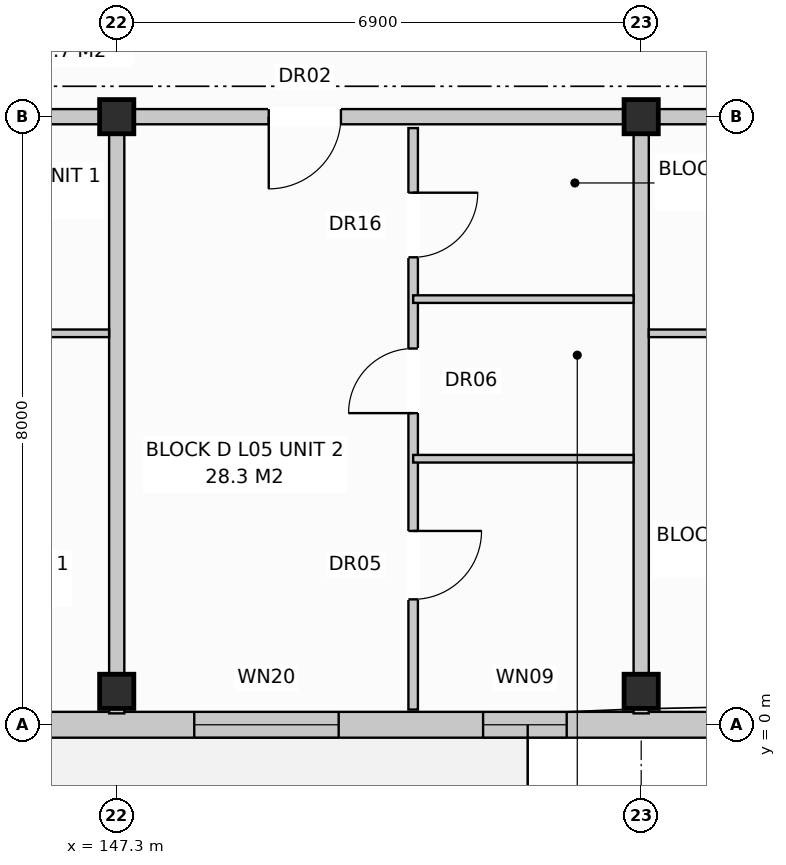
"""IFC4 building model, lengths in metres.
Left out: names, types, materials, properties, quantities, classifications, styles, units other than length and angle.
Written with IfcOpenShell. Run it as: python <this file> out.ifc"""

import sys

from ifc_helpers import new_model, si_unit, direction, frame, frame_2d, origin, origin_with_axes, origin_2d, place, context, subcontext, project, spatial, rectangle, extrude, element, fill, save


model = new_model("IFC4")
c1 = context("Model", 3, precision=1e-05, world=origin(), true_north=direction((0.0, 1.0)))
c2 = subcontext(c1, "Body", "Model", "MODEL_VIEW")
j1 = project(units=[si_unit("LENGTHUNIT", "METRE"), si_unit("PLANEANGLEUNIT", "RADIAN")], contexts=[c1])
p1 = place(None, origin())
s1 = spatial("IfcSite", under=j1, at=p1, CompositionType="ELEMENT")
p2 = place(p1, origin())
s2 = spatial("IfcBuilding", under=s1, at=p2, CompositionType="ELEMENT")
p3 = place(p2, frame((0.0, 0.0, 17.6)))
s3 = spatial("IfcBuildingStorey", under=s2, at=p3, CompositionType="ELEMENT", Elevation=17.6)
for number, where, z_axis, x_axis in (
    (1, (147.3, 0.44, 0.0), (0.0, 0.0, 1.0), (1.0, 0.0, 0.0)),
    (2, (147.3, 8.0, 0.0), (0.0, 0.0, 1.0), (1.0, 0.0, 0.0)),
    (3, (154.2, 0.44, 0.0), (0.0, 0.0, 1.0), (1.0, 0.0, 0.0)),
    (4, (154.2, 8.0, 0.0), (0.0, 0.0, 1.0), (1.0, 0.0, 0.0)),
):
    element("IfcColumn", number, at=place(p3, frame(where, z_axis=z_axis, x_axis=x_axis)), inside=s3, PredefinedType="COLUMN", context=c2, shape_type="SweptSolid", body=[
        extrude(rectangle(XDim=0.45, YDim=0.45, at=origin_2d()), origin(), (0.0, 0.0, 1.0), 3.2),
    ])
p4 = place(p3, frame((126.76, 0.0, 0.0), z_axis=(0.0, 0.0, 1.0), x_axis=(1.0, 0.0, 0.0)))
e5 = element("IfcWall", 5, at=p4, inside=s3, PredefinedType="STANDARD", context=c2, shape_type="SweptSolid", body=[
    extrude(rectangle(XDim=41.08, YDim=0.34, at=frame_2d((20.54, 0.0))), origin(), (0.0, 0.0, 1.0), 2.95),
])
p5 = place(p4, frame((4.853, 0.0, 0.0)))
e6 = element("IfcOpeningElement", 6, at=p5, cuts=e5, PredefinedType="OPENING", context=c2, shape_type="SweptSolid", body=[
    extrude(rectangle(XDim=1.05, YDim=2.12, at=frame_2d((0.525, 1.06))), frame((0.0, 0.182, 0.0), z_axis=(0.0, -1.0, 0.0), x_axis=(1.0, 0.0, 0.0)), (0.0, 0.0, 1.0), 0.364),
])
p6 = place(p4, frame((15.253, 0.0, 0.0)))
e7 = element("IfcOpeningElement", 7, at=p6, cuts=e5, PredefinedType="OPENING", context=c2, shape_type="SweptSolid", body=[
    extrude(rectangle(XDim=1.05, YDim=2.12, at=frame_2d((0.525, 1.06))), frame((0.0, 0.182, 0.0), z_axis=(0.0, -1.0, 0.0), x_axis=(1.0, 0.0, 0.0)), (0.0, 0.0, 1.0), 0.364),
])
p7 = place(p4, frame((30.353, 0.0, 0.0)))
e8 = element("IfcOpeningElement", 8, at=p7, cuts=e5, PredefinedType="OPENING", context=c2, shape_type="SweptSolid", body=[
    extrude(rectangle(XDim=1.05, YDim=2.12, at=frame_2d((0.525, 1.06))), frame((0.0, 0.182, 0.0), z_axis=(0.0, -1.0, 0.0), x_axis=(1.0, 0.0, 0.0)), (0.0, 0.0, 1.0), 0.364),
])
p8 = place(p4, frame((2.46, 0.0, 0.72)))
e9 = element("IfcOpeningElement", 9, at=p8, cuts=e5, PredefinedType="OPENING", context=c2, shape_type="SweptSolid", body=[
    extrude(rectangle(XDim=1.1, YDim=1.5, at=frame_2d((0.55, 0.75))), frame((0.0, 0.182, 0.0), z_axis=(0.0, -1.0, 0.0), x_axis=(1.0, 0.0, 0.0)), (0.0, 0.0, 1.0), 0.364),
])
p9 = place(p4, frame((7.76, 0.0, 0.72)))
e10 = element("IfcOpeningElement", 10, at=p9, cuts=e5, PredefinedType="OPENING", context=c2, shape_type="SweptSolid", body=[
    extrude(rectangle(XDim=1.9, YDim=1.85, at=frame_2d((0.95, 0.925))), frame((0.0, 0.182, 0.0), z_axis=(0.0, -1.0, 0.0), x_axis=(1.0, 0.0, 0.0)), (0.0, 0.0, 1.0), 0.364),
])
p10 = place(p4, frame((11.81, 0.0, 0.72)))
e11 = element("IfcOpeningElement", 11, at=p10, cuts=e5, PredefinedType="OPENING", context=c2, shape_type="SweptSolid", body=[
    extrude(rectangle(XDim=1.1, YDim=1.5, at=frame_2d((0.55, 0.75))), frame((0.0, 0.182, 0.0), z_axis=(0.0, -1.0, 0.0), x_axis=(1.0, 0.0, 0.0)), (0.0, 0.0, 1.0), 0.364),
])
p11 = place(p4, frame((17.61, 0.0, 0.8)))
e12 = element("IfcOpeningElement", 12, at=p11, cuts=e5, PredefinedType="OPENING", context=c2, shape_type="SweptSolid", body=[
    extrude(rectangle(XDim=1.8, YDim=1.7, at=frame_2d((0.9, 0.85))), frame((0.0, 0.182, 0.0), z_axis=(0.0, -1.0, 0.0), x_axis=(1.0, 0.0, 0.0)), (0.0, 0.0, 1.0), 0.364),
])
p12 = place(p4, frame((21.56, 0.0, 0.72)))
e13 = element("IfcOpeningElement", 13, at=p12, cuts=e5, PredefinedType="OPENING", context=c2, shape_type="SweptSolid", body=[
    extrude(rectangle(XDim=1.9, YDim=1.85, at=frame_2d((0.95, 0.925))), frame((0.0, 0.182, 0.0), z_axis=(0.0, -1.0, 0.0), x_axis=(1.0, 0.0, 0.0)), (0.0, 0.0, 1.0), 0.364),
])
p13 = place(p4, frame((25.36, 0.0, 0.72)))
e14 = element("IfcOpeningElement", 14, at=p13, cuts=e5, PredefinedType="OPENING", context=c2, shape_type="SweptSolid", body=[
    extrude(rectangle(XDim=1.1, YDim=1.5, at=frame_2d((0.55, 0.75))), frame((0.0, 0.182, 0.0), z_axis=(0.0, -1.0, 0.0), x_axis=(1.0, 0.0, 0.0)), (0.0, 0.0, 1.0), 0.364),
])
p14 = place(p4, frame((28.56, 0.0, 0.72)))
e15 = element("IfcOpeningElement", 15, at=p14, cuts=e5, PredefinedType="OPENING", context=c2, shape_type="SweptSolid", body=[
    extrude(rectangle(XDim=1.1, YDim=1.5, at=frame_2d((0.55, 0.75))), frame((0.0, 0.182, 0.0), z_axis=(0.0, -1.0, 0.0), x_axis=(1.0, 0.0, 0.0)), (0.0, 0.0, 1.0), 0.364),
])
p15 = place(p4, frame((31.96, 0.0, 0.72)))
e16 = element("IfcOpeningElement", 16, at=p15, cuts=e5, PredefinedType="OPENING", context=c2, shape_type="SweptSolid", body=[
    extrude(rectangle(XDim=1.9, YDim=1.85, at=frame_2d((0.95, 0.925))), frame((0.0, 0.182, 0.0), z_axis=(0.0, -1.0, 0.0), x_axis=(1.0, 0.0, 0.0)), (0.0, 0.0, 1.0), 0.364),
])
p16 = place(p4, frame((38.06, 0.0, 0.72)))
e17 = element("IfcOpeningElement", 17, at=p16, cuts=e5, PredefinedType="OPENING", context=c2, shape_type="SweptSolid", body=[
    extrude(rectangle(XDim=1.1, YDim=1.5, at=frame_2d((0.55, 0.75))), frame((0.0, 0.182, 0.0), z_axis=(0.0, -1.0, 0.0), x_axis=(1.0, 0.0, 0.0)), (0.0, 0.0, 1.0), 0.364),
])
p17 = place(p3, frame((147.3, 7.85, 0.0), z_axis=(0.0, 0.0, 1.0), x_axis=(0.0, -1.0, 0.0)))
e18 = element("IfcWall", 18, at=p17, inside=s3, PredefinedType="PARTITIONING", context=c2, shape_type="SweptSolid", body=[
    extrude(rectangle(XDim=7.7, YDim=0.2, at=frame_2d((3.85, 0.0))), origin(), (0.0, 0.0, 1.0), 2.95),
])
p18 = place(p3, frame((126.6, 8.0, 0.0), z_axis=(0.0, 0.0, 1.0), x_axis=(1.0, 0.0, 0.0)))
e19 = element("IfcWall", 19, at=p18, inside=s3, PredefinedType="PARTITIONING", context=c2, shape_type="SweptSolid", body=[
    extrude(rectangle(XDim=20.7, YDim=0.2, at=frame_2d((10.35, 0.0))), origin(), (0.0, 0.0, 1.0), 2.39),
])
p19 = place(p18, frame((2.4, 0.0, 0.0)))
e20 = element("IfcOpeningElement", 20, at=p19, cuts=e19, PredefinedType="OPENING", context=c2, shape_type="SweptSolid", body=[
    extrude(rectangle(XDim=0.95, YDim=2.15, at=frame_2d((0.475, 1.075))), frame((0.0, 0.112, 0.0), z_axis=(0.0, -1.0, 0.0), x_axis=(1.0, 0.0, 0.0)), (0.0, 0.0, 1.0), 0.224),
])
p20 = place(p3, frame((132.9, 5.15, 0.0), z_axis=(0.0, 0.0, 1.0), x_axis=(1.0, 0.0, 0.0)))
e21 = element("IfcWall", 21, at=p20, inside=s3, PredefinedType="PARTITIONING", context=c2, shape_type="SweptSolid", body=[
    extrude(rectangle(XDim=14.3, YDim=0.1, at=frame_2d((7.15, 0.0))), origin(), (0.0, 0.0, 1.0), 2.95),
])
p21 = place(p20, frame((1.6, 0.0, 0.0)))
e22 = element("IfcOpeningElement", 22, at=p21, cuts=e21, PredefinedType="OPENING", context=c2, shape_type="SweptSolid", body=[
    extrude(rectangle(XDim=0.9, YDim=2.1, at=frame_2d((0.45, 1.05))), frame((0.0, 0.062, 0.0), z_axis=(0.0, -1.0, 0.0), x_axis=(1.0, 0.0, 0.0)), (0.0, 0.0, 1.0), 0.124),
])
p22 = place(p20, frame((5.1, 0.0, 0.0)))
e23 = element("IfcOpeningElement", 23, at=p22, cuts=e21, PredefinedType="OPENING", context=c2, shape_type="SweptSolid", body=[
    extrude(rectangle(XDim=0.85, YDim=2.05, at=frame_2d((0.425, 1.025))), frame((0.0, 0.062, 0.0), z_axis=(0.0, -1.0, 0.0), x_axis=(1.0, 0.0, 0.0)), (0.0, 0.0, 1.0), 0.124),
])
p23 = place(p20, frame((8.2, 0.0, 0.0)))
e24 = element("IfcOpeningElement", 24, at=p23, cuts=e21, PredefinedType="OPENING", context=c2, shape_type="SweptSolid", body=[
    extrude(rectangle(XDim=0.85, YDim=2.05, at=frame_2d((0.425, 1.025))), frame((0.0, 0.062, 0.0), z_axis=(0.0, -1.0, 0.0), x_axis=(1.0, 0.0, 0.0)), (0.0, 0.0, 1.0), 0.124),
])
p24 = place(p20, frame((11.6, 0.0, 0.0)))
e25 = element("IfcOpeningElement", 25, at=p24, cuts=e21, PredefinedType="OPENING", context=c2, shape_type="SweptSolid", body=[
    extrude(rectangle(XDim=0.85, YDim=2.05, at=frame_2d((0.425, 1.025))), frame((0.0, 0.062, 0.0), z_axis=(0.0, -1.0, 0.0), x_axis=(1.0, 0.0, 0.0)), (0.0, 0.0, 1.0), 0.124),
])
p25 = place(p3, frame((154.2, 7.85, 0.0), z_axis=(0.0, 0.0, 1.0), x_axis=(0.0, -1.0, 0.0)))
e26 = element("IfcWall", 26, at=p25, inside=s3, PredefinedType="PARTITIONING", context=c2, shape_type="SweptSolid", body=[
    extrude(rectangle(XDim=7.7, YDim=0.2, at=frame_2d((3.85, 0.0))), origin(), (0.0, 0.0, 1.0), 2.95),
])
p26 = place(p3, frame((147.3, 8.0, 0.0), z_axis=(0.0, 0.0, 1.0), x_axis=(1.0, 0.0, 0.0)))
e27 = element("IfcWall", 27, at=p26, inside=s3, PredefinedType="PARTITIONING", context=c2, shape_type="SweptSolid", body=[
    extrude(rectangle(XDim=6.9, YDim=0.2, at=frame_2d((3.45, 0.0))), origin(), (0.0, 0.0, 1.0), 2.39),
])
p27 = place(p26, frame((2.0, 0.0, 0.0)))
e28 = element("IfcOpeningElement", 28, at=p27, cuts=e27, PredefinedType="OPENING", context=c2, shape_type="SweptSolid", body=[
    extrude(rectangle(XDim=0.95, YDim=2.15, at=frame_2d((0.475, 1.075))), frame((0.0, 0.112, 0.0), z_axis=(0.0, -1.0, 0.0), x_axis=(1.0, 0.0, 0.0)), (0.0, 0.0, 1.0), 0.224),
])
p28 = place(p3, frame((151.2, 7.85, 0.0), z_axis=(0.0, 0.0, 1.0), x_axis=(0.0, -1.0, 0.0)))
e29 = element("IfcWall", 29, at=p28, inside=s3, PredefinedType="PARTITIONING", context=c2, shape_type="SweptSolid", body=[
    extrude(rectangle(XDim=7.65, YDim=0.125, at=frame_2d((3.825, 0.0))), origin(), (0.0, 0.0, 1.0), 2.95),
])
p29 = place(p28, frame((0.85, 0.0, 0.0)))
e30 = element("IfcOpeningElement", 30, at=p29, cuts=e29, PredefinedType="OPENING", context=c2, shape_type="SweptSolid", body=[
    extrude(rectangle(XDim=0.85, YDim=2.1, at=frame_2d((0.425, 1.05))), frame((0.0, 0.074, 0.0), z_axis=(0.0, -1.0, 0.0), x_axis=(1.0, 0.0, 0.0)), (0.0, 0.0, 1.0), 0.149),
])
p30 = place(p28, frame((2.9, 0.0, 0.0)))
e31 = element("IfcOpeningElement", 31, at=p30, cuts=e29, PredefinedType="OPENING", context=c2, shape_type="SweptSolid", body=[
    extrude(rectangle(XDim=0.85, YDim=2.05, at=frame_2d((0.425, 1.025))), frame((0.0, 0.074, 0.0), z_axis=(0.0, -1.0, 0.0), x_axis=(1.0, 0.0, 0.0)), (0.0, 0.0, 1.0), 0.149),
])
p31 = place(p28, frame((5.3, 0.0, 0.0)))
e32 = element("IfcOpeningElement", 32, at=p31, cuts=e29, PredefinedType="OPENING", context=c2, shape_type="SweptSolid", body=[
    extrude(rectangle(XDim=0.9, YDim=2.1, at=frame_2d((0.45, 1.05))), frame((0.0, 0.074, 0.0), z_axis=(0.0, -1.0, 0.0), x_axis=(1.0, 0.0, 0.0)), (0.0, 0.0, 1.0), 0.149),
])
for number, where, z_axis, x_axis in (
    (33, (151.2, 5.6, 0.0), (0.0, 0.0, 1.0), (1.0, 0.0, 0.0)),
    (34, (151.2, 3.5, 0.0), (0.0, 0.0, 1.0), (1.0, 0.0, 0.0)),
):
    element("IfcWall", number, at=place(p3, frame(where, z_axis=z_axis, x_axis=x_axis)), inside=s3, PredefinedType="PARTITIONING", context=c2, shape_type="SweptSolid", body=[
        extrude(rectangle(XDim=2.9, YDim=0.1, at=frame_2d((1.45, 0.0))), origin(), (0.0, 0.0, 1.0), 2.95),
    ])
p32 = place(p3, frame((154.2, 8.0, 0.0), z_axis=(0.0, 0.0, 1.0), x_axis=(1.0, 0.0, 0.0)))
e35 = element("IfcWall", 35, at=p32, inside=s3, PredefinedType="PARTITIONING", context=c2, shape_type="SweptSolid", body=[
    extrude(rectangle(XDim=13.8, YDim=0.2, at=frame_2d((6.9, 0.0))), origin(), (0.0, 0.0, 1.0), 2.39),
])
p33 = place(p32, frame((9.6, 0.0, 0.0)))
e36 = element("IfcOpeningElement", 36, at=p33, cuts=e35, PredefinedType="OPENING", context=c2, shape_type="SweptSolid", body=[
    extrude(rectangle(XDim=0.95, YDim=2.15, at=frame_2d((0.475, 1.075))), frame((0.0, 0.112, 0.0), z_axis=(0.0, -1.0, 0.0), x_axis=(1.0, 0.0, 0.0)), (0.0, 0.0, 1.0), 0.224),
])
p34 = place(p3, frame((154.3, 5.15, 0.0), z_axis=(0.0, 0.0, 1.0), x_axis=(1.0, 0.0, 0.0)))
e37 = element("IfcWall", 37, at=p34, inside=s3, PredefinedType="PARTITIONING", context=c2, shape_type="SweptSolid", body=[
    extrude(rectangle(XDim=8.6, YDim=0.1, at=frame_2d((4.3, 0.0))), origin(), (0.0, 0.0, 1.0), 2.95),
])
p35 = place(p34, frame((1.4, 0.0, 0.0)))
e38 = element("IfcOpeningElement", 38, at=p35, cuts=e37, PredefinedType="OPENING", context=c2, shape_type="SweptSolid", body=[
    extrude(rectangle(XDim=0.85, YDim=2.05, at=frame_2d((0.425, 1.025))), frame((0.0, 0.062, 0.0), z_axis=(0.0, -1.0, 0.0), x_axis=(1.0, 0.0, 0.0)), (0.0, 0.0, 1.0), 0.124),
])
p36 = place(p34, frame((4.65, 0.0, 0.0)))
e39 = element("IfcOpeningElement", 39, at=p36, cuts=e37, PredefinedType="OPENING", context=c2, shape_type="SweptSolid", body=[
    extrude(rectangle(XDim=0.85, YDim=2.05, at=frame_2d((0.425, 1.025))), frame((0.0, 0.062, 0.0), z_axis=(0.0, -1.0, 0.0), x_axis=(1.0, 0.0, 0.0)), (0.0, 0.0, 1.0), 0.124),
])
p37 = place(p34, frame((6.8, 0.0, 0.0)))
e40 = element("IfcOpeningElement", 40, at=p37, cuts=e37, PredefinedType="OPENING", context=c2, shape_type="SweptSolid", body=[
    extrude(rectangle(XDim=0.85, YDim=2.1, at=frame_2d((0.425, 1.05))), frame((0.0, 0.062, 0.0), z_axis=(0.0, -1.0, 0.0), x_axis=(1.0, 0.0, 0.0)), (0.0, 0.0, 1.0), 0.124),
])
p38 = place(p12, origin_with_axes())
e41 = element("IfcWindow", 41, at=p38, inside=s3, PartitioningType="SINGLE_PANEL", PredefinedType="WINDOW", context=c2, shape_type="SweptSolid", body=[
    extrude(rectangle(XDim=1.9, YDim=1.85, at=frame_2d((0.95, 0.925))), frame((0.0, 0.03, 0.0), z_axis=(0.0, -1.0, 0.0), x_axis=(1.0, 0.0, 0.0)), (0.0, 0.0, 1.0), 0.06),
])
fill(e13, e41)
p39 = place(p13, origin_with_axes())
e42 = element("IfcWindow", 42, at=p39, inside=s3, PartitioningType="SINGLE_PANEL", PredefinedType="WINDOW", context=c2, shape_type="SweptSolid", body=[
    extrude(rectangle(XDim=1.1, YDim=1.5, at=frame_2d((0.55, 0.75))), frame((0.0, 0.03, 0.0), z_axis=(0.0, -1.0, 0.0), x_axis=(1.0, 0.0, 0.0)), (0.0, 0.0, 1.0), 0.06),
])
fill(e14, e42)
p40 = place(p27, frame((0.95, 0.0, 0.0), z_axis=(0.0, 0.0, 1.0), x_axis=(-1.0, 0.0, 0.0)))
e43 = element("IfcDoor", 43, at=p40, inside=s3, OperationType="SINGLE_SWING_LEFT", PredefinedType="DOOR", context=c2, shape_type="SweptSolid", body=[
    extrude(rectangle(XDim=0.95, YDim=2.15, at=frame_2d((0.475, 1.075))), frame((0.0, 0.025, 0.0), z_axis=(0.0, -1.0, 0.0), x_axis=(1.0, 0.0, 0.0)), (0.0, 0.0, 1.0), 0.05),
])
fill(e28, e43)
p41 = place(p29, origin_with_axes())
e44 = element("IfcDoor", 44, at=p41, inside=s3, OperationType="SINGLE_SWING_LEFT", PredefinedType="DOOR", context=c2, shape_type="SweptSolid", body=[
    extrude(rectangle(XDim=0.85, YDim=2.1, at=frame_2d((0.425, 1.05))), frame((0.0, 0.025, 0.0), z_axis=(0.0, -1.0, 0.0), x_axis=(1.0, 0.0, 0.0)), (0.0, 0.0, 1.0), 0.05),
])
fill(e30, e44)
p42 = place(p30, frame((0.85, 0.0, 0.0), z_axis=(0.0, 0.0, 1.0), x_axis=(-1.0, 0.0, 0.0)))
e45 = element("IfcDoor", 45, at=p42, inside=s3, OperationType="SINGLE_SWING_RIGHT", PredefinedType="DOOR", context=c2, shape_type="SweptSolid", body=[
    extrude(rectangle(XDim=0.85, YDim=2.05, at=frame_2d((0.425, 1.025))), frame((0.0, 0.025, 0.0), z_axis=(0.0, -1.0, 0.0), x_axis=(1.0, 0.0, 0.0)), (0.0, 0.0, 1.0), 0.05),
])
fill(e31, e45)
p43 = place(p31, origin_with_axes())
e46 = element("IfcDoor", 46, at=p43, inside=s3, OperationType="SINGLE_SWING_LEFT", PredefinedType="DOOR", context=c2, shape_type="SweptSolid", body=[
    extrude(rectangle(XDim=0.9, YDim=2.1, at=frame_2d((0.45, 1.05))), frame((0.0, 0.025, 0.0), z_axis=(0.0, -1.0, 0.0), x_axis=(1.0, 0.0, 0.0)), (0.0, 0.0, 1.0), 0.05),
])
fill(e32, e46)
save(model, sys.argv[1])
